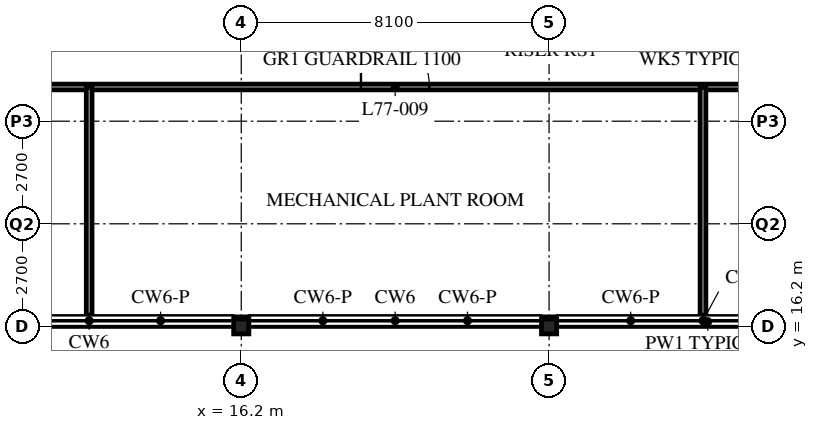
"""IFC4 building model, lengths in metres.
Left out: names, types, materials, properties, quantities, classifications, styles, units other than length and angle.
Written with IfcOpenShell. Run it as: python <this file> out.ifc"""

import sys

from ifc_helpers import new_model, si_unit, direction, frame, frame_2d, origin, origin_2d, place, context, subcontext, project, spatial, rectangle, i_section, extrude, element, fill, save


model = new_model("IFC4")
c1 = context("Model", 3, precision=1e-05, world=origin(), true_north=direction((0.0, 1.0)))
c2 = subcontext(c1, "Body", "Model", "MODEL_VIEW")
j1 = project(units=[si_unit("LENGTHUNIT", "METRE"), si_unit("PLANEANGLEUNIT", "RADIAN")], contexts=[c1])
p1 = place(None, origin())
s1 = spatial("IfcSite", under=j1, at=p1, CompositionType="ELEMENT")
p2 = place(p1, origin())
s2 = spatial("IfcBuilding", under=s1, at=p2, CompositionType="ELEMENT")
p3 = place(p2, frame((0.0, 0.0, 303.9)))
s3 = spatial("IfcBuildingStorey", under=s2, at=p3, CompositionType="ELEMENT", Elevation=303.9)
for number, where, z_axis, x_axis in (
    (1, (16.2, 16.2, 0.0), (0.0, 0.0, 1.0), (1.0, 0.0, 0.0)),
    (2, (24.3, 16.2, 0.0), (0.0, 0.0, 1.0), (1.0, 0.0, 0.0)),
):
    element("IfcColumn", number, at=place(p3, frame(where, z_axis=z_axis, x_axis=x_axis)), inside=s3, PredefinedType="COLUMN", context=c2, shape_type="SweptSolid", body=[
        extrude(i_section(OverallWidth=0.399, OverallDepth=0.394, WebThickness=0.023, FlangeThickness=0.037, FilletRadius=0.015, at=origin_2d()), origin(), (0.0, 0.0, 1.0), 6.0),
    ])
p4 = place(p3, frame((8.35, 16.325, 6.0), z_axis=(0.0, 0.0, 1.0), x_axis=(1.0, 0.0, 0.0)))
e3 = element("IfcWall", 3, at=p4, inside=s3, PredefinedType="PARAPET", context=c2, shape_type="SweptSolid", body=[
    extrude(rectangle(XDim=40.25, YDim=0.25, at=frame_2d((20.125, 0.0))), origin(), (0.0, 0.0, 1.0), 1.285),
])
p5 = place(p3, frame((8.1, 22.5, 0.0), z_axis=(0.0, 0.0, 1.0), x_axis=(1.0, 0.0, 0.0)))
e4 = element("IfcWall", 4, at=p5, inside=s3, PredefinedType="PARTITIONING", context=c2, shape_type="SweptSolid", body=[
    extrude(rectangle(XDim=40.5, YDim=0.15, at=frame_2d((20.25, 0.0))), origin(), (0.0, 0.0, 1.0), 5.8),
])
p6 = place(p5, frame((11.25, 0.0, 0.0)))
e5 = element("IfcOpeningElement", 5, at=p6, cuts=e4, PredefinedType="OPENING", context=c2, shape_type="SweptSolid", body=[
    extrude(rectangle(XDim=1.8, YDim=2.4, at=frame_2d((0.9, 1.2))), frame((0.0, 0.085, 0.0), z_axis=(0.0, -1.0, 0.0), x_axis=(1.0, 0.0, 0.0)), (0.0, 0.0, 1.0), 0.17),
])
p7 = place(p5, frame((27.45, 0.0, 0.0)))
e6 = element("IfcOpeningElement", 6, at=p7, cuts=e4, PredefinedType="OPENING", context=c2, shape_type="SweptSolid", body=[
    extrude(rectangle(XDim=1.8, YDim=2.4, at=frame_2d((0.9, 1.2))), frame((0.0, 0.085, 0.0), z_axis=(0.0, -1.0, 0.0), x_axis=(1.0, 0.0, 0.0)), (0.0, 0.0, 1.0), 0.17),
])
p8 = place(p5, frame((1.525, 0.0, 0.0)))
e7 = element("IfcOpeningElement", 7, at=p8, cuts=e4, PredefinedType="OPENING", context=c2, shape_type="SweptSolid", body=[
    extrude(rectangle(XDim=1.0, YDim=2.1, at=frame_2d((0.5, 1.05))), frame((0.0, 0.085, 0.0), z_axis=(0.0, -1.0, 0.0), x_axis=(1.0, 0.0, 0.0)), (0.0, 0.0, 1.0), 0.17),
])
p9 = place(p5, frame((37.975, 0.0, 0.0)))
e8 = element("IfcOpeningElement", 8, at=p9, cuts=e4, PredefinedType="OPENING", context=c2, shape_type="SweptSolid", body=[
    extrude(rectangle(XDim=1.0, YDim=2.1, at=frame_2d((0.5, 1.05))), frame((0.0, 0.085, 0.0), z_axis=(0.0, -1.0, 0.0), x_axis=(1.0, 0.0, 0.0)), (0.0, 0.0, 1.0), 0.17),
])
for number, where, z_axis, x_axis in (
    (9, (28.35, 22.5, 0.0), (0.0, 0.0, 1.0), (0.0, -1.0, 0.0)),
    (10, (12.198, 22.5, 0.0), (0.0, 0.0, 1.0), (0.0, -1.0, 0.0)),
):
    element("IfcWall", number, at=place(p3, frame(where, z_axis=z_axis, x_axis=x_axis)), inside=s3, PredefinedType="PARTITIONING", context=c2, shape_type="SweptSolid", body=[
        extrude(rectangle(XDim=6.007, YDim=0.15, at=frame_2d((3.003, 0.0))), origin(), (0.0, 0.0, 1.0), 5.8),
    ])
p10 = place(p6, origin())
e11 = element("IfcDoor", 11, at=p10, inside=s3, OperationType="DOUBLE_DOOR_SINGLE_SWING", PredefinedType="DOOR", context=c2, shape_type="SweptSolid", body=[
    extrude(rectangle(XDim=1.8, YDim=2.4, at=frame_2d((0.9, 1.2))), frame((0.0, 0.025, 0.0), z_axis=(0.0, -1.0, 0.0), x_axis=(1.0, 0.0, 0.0)), (0.0, 0.0, 1.0), 0.05),
])
fill(e5, e11)
save(model, sys.argv[1])
